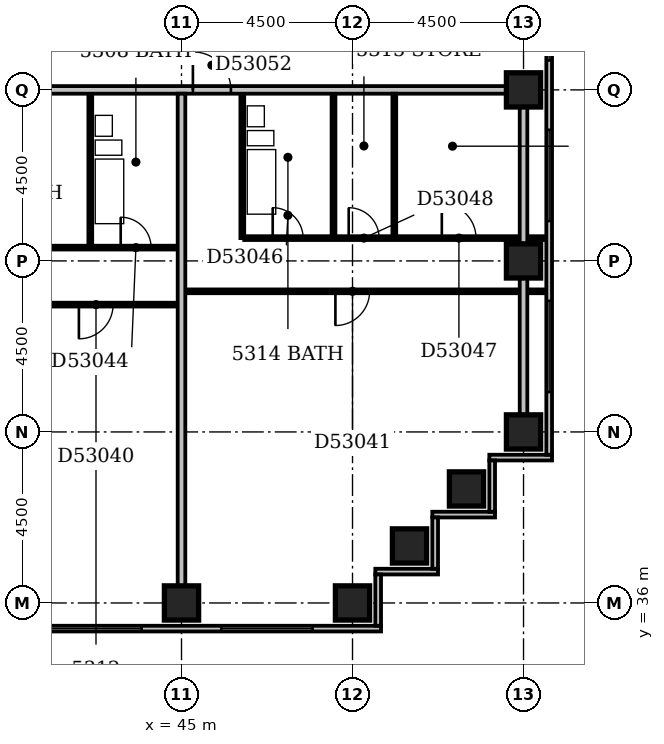
"""IFC4 building model, lengths in metres.
Left out: names, types, materials, properties, quantities, classifications, styles, units other than length and angle.
Written with IfcOpenShell. Run it as: python <this file> out.ifc"""

import sys

from ifc_helpers import new_model, si_unit, direction, frame, frame_2d, origin, origin_2d, place, context, subcontext, project, spatial, rectangle, extrude, element, fill, save


model = new_model("IFC4")
c1 = context("Model", 3, precision=1e-05, world=origin(), true_north=direction((0.0, 1.0)))
c2 = subcontext(c1, "Body", "Model", "MODEL_VIEW")
j1 = project(units=[si_unit("LENGTHUNIT", "METRE"), si_unit("PLANEANGLEUNIT", "RADIAN")], contexts=[c1])
p1 = place(None, origin())
s1 = spatial("IfcSite", under=j1, at=p1, CompositionType="ELEMENT")
p2 = place(p1, origin())
s2 = spatial("IfcBuilding", under=s1, at=p2, CompositionType="ELEMENT")
p3 = place(p2, frame((0.0, 0.0, 207.8)))
s3 = spatial("IfcBuildingStorey", under=s2, at=p3, CompositionType="ELEMENT", Elevation=207.8)
for number, where, z_axis, x_axis in (
    (1, (45.0, 36.0, -0.3), (0.0, 0.0, 1.0), (1.0, 0.0, 0.0)),
    (2, (49.5, 36.0, -0.3), (0.0, 0.0, 1.0), (1.0, 0.0, 0.0)),
    (3, (51.0, 37.5, -0.3), (0.0, 0.0, 1.0), (1.0, 0.0, 0.0)),
    (4, (52.5, 39.0, -0.3), (0.0, 0.0, 1.0), (1.0, 0.0, 0.0)),
    (5, (54.0, 40.5, -0.3), (0.0, 0.0, 1.0), (1.0, 0.0, 0.0)),
    (6, (54.0, 45.0, -0.3), (0.0, 0.0, 1.0), (1.0, 0.0, 0.0)),
    (7, (54.0, 49.5, -0.3), (0.0, 0.0, 1.0), (1.0, 0.0, 0.0)),
):
    element("IfcColumn", number, at=place(p3, frame(where, z_axis=z_axis, x_axis=x_axis)), inside=s3, PredefinedType="COLUMN", context=c2, shape_type="SweptSolid", body=[
        extrude(rectangle(XDim=0.9, YDim=0.9, at=origin_2d()), origin(), (0.0, 0.0, 1.0), 3.55),
    ])
p4 = place(p3, frame((23.1, 35.325, 0.0), z_axis=(0.0, 0.0, 1.0), x_axis=(1.0, 0.0, 0.0)))
e8 = element("IfcWall", 8, at=p4, inside=s3, PredefinedType="STANDARD", context=c2, shape_type="SweptSolid", body=[
    extrude(rectangle(XDim=27.15, YDim=0.15, at=frame_2d((13.575, 0.0))), origin(), (0.0, 0.0, 1.0), 2.7),
])
p5 = place(p4, frame((0.45, 0.0, 0.6)))
e9 = element("IfcOpeningElement", 9, at=p5, cuts=e8, PredefinedType="OPENING", context=c2, shape_type="SweptSolid", body=[
    extrude(rectangle(XDim=2.4, YDim=1.8, at=frame_2d((1.2, 0.9))), frame((0.0, 0.087, 0.0), z_axis=(0.0, -1.0, 0.0), x_axis=(1.0, 0.0, 0.0)), (0.0, 0.0, 1.0), 0.174),
])
p6 = place(p4, frame((4.95, 0.0, 0.6)))
e10 = element("IfcOpeningElement", 10, at=p6, cuts=e8, PredefinedType="OPENING", context=c2, shape_type="SweptSolid", body=[
    extrude(rectangle(XDim=2.4, YDim=1.8, at=frame_2d((1.2, 0.9))), frame((0.0, 0.087, 0.0), z_axis=(0.0, -1.0, 0.0), x_axis=(1.0, 0.0, 0.0)), (0.0, 0.0, 1.0), 0.174),
])
p7 = place(p4, frame((9.189, 0.0, 0.6)))
e11 = element("IfcOpeningElement", 11, at=p7, cuts=e8, PredefinedType="OPENING", context=c2, shape_type="SweptSolid", body=[
    extrude(rectangle(XDim=2.1, YDim=1.8, at=frame_2d((1.05, 0.9))), frame((0.0, 0.087, 0.0), z_axis=(0.0, -1.0, 0.0), x_axis=(1.0, 0.0, 0.0)), (0.0, 0.0, 1.0), 0.174),
])
p8 = place(p4, frame((14.558, 0.0, 0.6)))
e12 = element("IfcOpeningElement", 12, at=p8, cuts=e8, PredefinedType="OPENING", context=c2, shape_type="SweptSolid", body=[
    extrude(rectangle(XDim=2.1, YDim=1.8, at=frame_2d((1.05, 0.9))), frame((0.0, 0.087, 0.0), z_axis=(0.0, -1.0, 0.0), x_axis=(1.0, 0.0, 0.0)), (0.0, 0.0, 1.0), 0.174),
])
p9 = place(p4, frame((18.45, 0.0, 0.6)))
e13 = element("IfcOpeningElement", 13, at=p9, cuts=e8, PredefinedType="OPENING", context=c2, shape_type="SweptSolid", body=[
    extrude(rectangle(XDim=2.4, YDim=1.8, at=frame_2d((1.2, 0.9))), frame((0.0, 0.087, 0.0), z_axis=(0.0, -1.0, 0.0), x_axis=(1.0, 0.0, 0.0)), (0.0, 0.0, 1.0), 0.174),
])
p10 = place(p4, frame((22.95, 0.0, 0.6)))
e14 = element("IfcOpeningElement", 14, at=p10, cuts=e8, PredefinedType="OPENING", context=c2, shape_type="SweptSolid", body=[
    extrude(rectangle(XDim=2.4, YDim=1.8, at=frame_2d((1.2, 0.9))), frame((0.0, 0.087, 0.0), z_axis=(0.0, -1.0, 0.0), x_axis=(1.0, 0.0, 0.0)), (0.0, 0.0, 1.0), 0.174),
])
p11 = place(p3, frame((50.175, 35.4, 0.0), z_axis=(0.0, 0.0, 1.0), x_axis=(0.0, 1.0, 0.0)))
e15 = element("IfcWall", 15, at=p11, inside=s3, PredefinedType="STANDARD", context=c2, shape_type="SweptSolid", body=[
    extrude(rectangle(XDim=1.35, YDim=0.15, at=frame_2d((0.675, 0.0))), origin(), (0.0, 0.0, 1.0), 2.7),
])
p12 = place(p3, frame((50.1, 36.825, 0.0), z_axis=(0.0, 0.0, 1.0), x_axis=(1.0, 0.0, 0.0)))
e16 = element("IfcWall", 16, at=p12, inside=s3, PredefinedType="STANDARD", context=c2, shape_type="SweptSolid", body=[
    extrude(rectangle(XDim=1.65, YDim=0.15, at=frame_2d((0.825, 0.0))), origin(), (0.0, 0.0, 1.0), 2.7),
])
p13 = place(p3, frame((51.675, 36.9, 0.0), z_axis=(0.0, 0.0, 1.0), x_axis=(0.0, 1.0, 0.0)))
e17 = element("IfcWall", 17, at=p13, inside=s3, PredefinedType="STANDARD", context=c2, shape_type="SweptSolid", body=[
    extrude(rectangle(XDim=1.35, YDim=0.15, at=frame_2d((0.675, 0.0))), origin(), (0.0, 0.0, 1.0), 2.7),
])
p14 = place(p3, frame((51.6, 38.325, 0.0), z_axis=(0.0, 0.0, 1.0), x_axis=(1.0, 0.0, 0.0)))
e18 = element("IfcWall", 18, at=p14, inside=s3, PredefinedType="STANDARD", context=c2, shape_type="SweptSolid", body=[
    extrude(rectangle(XDim=1.65, YDim=0.15, at=frame_2d((0.825, 0.0))), origin(), (0.0, 0.0, 1.0), 2.7),
])
p15 = place(p3, frame((53.175, 38.4, 0.0), z_axis=(0.0, 0.0, 1.0), x_axis=(0.0, 1.0, 0.0)))
e19 = element("IfcWall", 19, at=p15, inside=s3, PredefinedType="STANDARD", context=c2, shape_type="SweptSolid", body=[
    extrude(rectangle(XDim=1.35, YDim=0.15, at=frame_2d((0.675, 0.0))), origin(), (0.0, 0.0, 1.0), 2.7),
])
p16 = place(p3, frame((53.1, 39.825, 0.0), z_axis=(0.0, 0.0, 1.0), x_axis=(1.0, 0.0, 0.0)))
e20 = element("IfcWall", 20, at=p16, inside=s3, PredefinedType="STANDARD", context=c2, shape_type="SweptSolid", body=[
    extrude(rectangle(XDim=1.65, YDim=0.15, at=frame_2d((0.825, 0.0))), origin(), (0.0, 0.0, 1.0), 2.7),
])
p17 = place(p3, frame((54.675, 39.9, 0.0), z_axis=(0.0, 0.0, 1.0), x_axis=(0.0, 1.0, 0.0)))
e21 = element("IfcWall", 21, at=p17, inside=s3, PredefinedType="STANDARD", context=c2, shape_type="SweptSolid", body=[
    extrude(rectangle(XDim=14.85, YDim=0.15, at=frame_2d((7.425, 0.0))), origin(), (0.0, 0.0, 1.0), 2.7),
])
p18 = place(p17, frame((1.65, 0.0, 0.6)))
e22 = element("IfcOpeningElement", 22, at=p18, cuts=e21, PredefinedType="OPENING", context=c2, shape_type="SweptSolid", body=[
    extrude(rectangle(XDim=2.4, YDim=1.8, at=frame_2d((1.2, 0.9))), frame((0.0, 0.087, 0.0), z_axis=(0.0, -1.0, 0.0), x_axis=(1.0, 0.0, 0.0)), (0.0, 0.0, 1.0), 0.174),
])
p19 = place(p17, frame((6.15, 0.0, 0.6)))
e23 = element("IfcOpeningElement", 23, at=p19, cuts=e21, PredefinedType="OPENING", context=c2, shape_type="SweptSolid", body=[
    extrude(rectangle(XDim=2.4, YDim=1.8, at=frame_2d((1.2, 0.9))), frame((0.0, 0.087, 0.0), z_axis=(0.0, -1.0, 0.0), x_axis=(1.0, 0.0, 0.0)), (0.0, 0.0, 1.0), 0.174),
])
p20 = place(p17, frame((10.375, 0.0, 0.6)))
e24 = element("IfcOpeningElement", 24, at=p20, cuts=e21, PredefinedType="OPENING", context=c2, shape_type="SweptSolid", body=[
    extrude(rectangle(XDim=0.9, YDim=1.8, at=frame_2d((0.45, 0.9))), frame((0.0, 0.087, 0.0), z_axis=(0.0, -1.0, 0.0), x_axis=(1.0, 0.0, 0.0)), (0.0, 0.0, 1.0), 0.174),
])
p21 = place(p17, frame((11.848, 0.0, 0.6)))
e25 = element("IfcOpeningElement", 25, at=p21, cuts=e21, PredefinedType="OPENING", context=c2, shape_type="SweptSolid", body=[
    extrude(rectangle(XDim=0.6, YDim=1.8, at=frame_2d((0.3, 0.9))), frame((0.0, 0.087, 0.0), z_axis=(0.0, -1.0, 0.0), x_axis=(1.0, 0.0, 0.0)), (0.0, 0.0, 1.0), 0.174),
])
p22 = place(p3, frame((45.0, 36.45, 0.0), z_axis=(0.0, 0.0, 1.0), x_axis=(0.0, 1.0, 0.0)))
e26 = element("IfcWall", 26, at=p22, inside=s3, PredefinedType="PARTITIONING", context=c2, shape_type="SweptSolid", body=[
    extrude(rectangle(XDim=12.95, YDim=0.2, at=frame_2d((6.475, 0.0))), origin(), (0.0, 0.0, 1.0), 2.55),
])
p23 = place(p3, frame((54.0, 40.95, 0.0), z_axis=(0.0, 0.0, 1.0), x_axis=(0.0, 1.0, 0.0)))
e27 = element("IfcWall", 27, at=p23, inside=s3, PredefinedType="PARTITIONING", context=c2, shape_type="SweptSolid", body=[
    extrude(rectangle(XDim=8.1, YDim=0.2, at=frame_2d((4.05, 0.0))), origin(), (0.0, 0.0, 1.0), 2.7),
])
p24 = place(p3, frame((31.6, 43.85, 0.0), z_axis=(0.0, 0.0, 1.0), x_axis=(1.0, 0.0, 0.0)))
e28 = element("IfcWall", 28, at=p24, inside=s3, PredefinedType="PARTITIONING", context=c2, shape_type="SweptSolid", body=[
    extrude(rectangle(XDim=13.3, YDim=0.1, at=frame_2d((6.65, 0.0))), origin(), (0.0, 0.0, 1.0), 3.25),
])
p25 = place(p24, frame((1.7, 0.0, 0.0)))
e29 = element("IfcOpeningElement", 29, at=p25, cuts=e28, PredefinedType="OPENING", context=c2, shape_type="SweptSolid", body=[
    extrude(rectangle(XDim=0.9, YDim=2.1, at=frame_2d((0.45, 1.05))), frame((0.0, 0.062, 0.0), z_axis=(0.0, -1.0, 0.0), x_axis=(1.0, 0.0, 0.0)), (0.0, 0.0, 1.0), 0.124),
])
p26 = place(p24, frame((7.35, 0.0, 0.0)))
e30 = element("IfcOpeningElement", 30, at=p26, cuts=e28, PredefinedType="OPENING", context=c2, shape_type="SweptSolid", body=[
    extrude(rectangle(XDim=0.9, YDim=2.1, at=frame_2d((0.45, 1.05))), frame((0.0, 0.062, 0.0), z_axis=(0.0, -1.0, 0.0), x_axis=(1.0, 0.0, 0.0)), (0.0, 0.0, 1.0), 0.124),
])
p27 = place(p24, frame((10.7, 0.0, 0.0)))
e31 = element("IfcOpeningElement", 31, at=p27, cuts=e28, PredefinedType="OPENING", context=c2, shape_type="SweptSolid", body=[
    extrude(rectangle(XDim=0.9, YDim=2.1, at=frame_2d((0.45, 1.05))), frame((0.0, 0.062, 0.0), z_axis=(0.0, -1.0, 0.0), x_axis=(1.0, 0.0, 0.0)), (0.0, 0.0, 1.0), 0.124),
])
p28 = place(p3, frame((45.1, 44.2, 0.0), z_axis=(0.0, 0.0, 1.0), x_axis=(1.0, 0.0, 0.0)))
e32 = element("IfcWall", 32, at=p28, inside=s3, PredefinedType="PARTITIONING", context=c2, shape_type="SweptSolid", body=[
    extrude(rectangle(XDim=9.5, YDim=0.1, at=frame_2d((4.75, 0.0))), origin(), (0.0, 0.0, 1.0), 3.25),
])
p29 = place(p28, frame((3.95, 0.0, 0.0)))
e33 = element("IfcOpeningElement", 33, at=p29, cuts=e32, PredefinedType="OPENING", context=c2, shape_type="SweptSolid", body=[
    extrude(rectangle(XDim=0.9, YDim=2.1, at=frame_2d((0.45, 1.05))), frame((0.0, 0.062, 0.0), z_axis=(0.0, -1.0, 0.0), x_axis=(1.0, 0.0, 0.0)), (0.0, 0.0, 1.0), 0.124),
])
p30 = place(p3, frame((33.15, 45.35, 0.0), z_axis=(0.0, 0.0, 1.0), x_axis=(1.0, 0.0, 0.0)))
e34 = element("IfcWall", 34, at=p30, inside=s3, PredefinedType="PARTITIONING", context=c2, shape_type="SweptSolid", body=[
    extrude(rectangle(XDim=11.75, YDim=0.1, at=frame_2d((5.875, 0.0))), origin(), (0.0, 0.0, 1.0), 3.25),
])
p31 = place(p30, frame((10.25, 0.0, 0.0)))
e35 = element("IfcOpeningElement", 35, at=p31, cuts=e34, PredefinedType="OPENING", context=c2, shape_type="SweptSolid", body=[
    extrude(rectangle(XDim=0.8, YDim=2.1, at=frame_2d((0.4, 1.05))), frame((0.0, 0.062, 0.0), z_axis=(0.0, -1.0, 0.0), x_axis=(1.0, 0.0, 0.0)), (0.0, 0.0, 1.0), 0.124),
])
p32 = place(p30, frame((4.25, 0.0, 0.0)))
e36 = element("IfcOpeningElement", 36, at=p32, cuts=e34, PredefinedType="OPENING", context=c2, shape_type="SweptSolid", body=[
    extrude(rectangle(XDim=0.9, YDim=2.1, at=frame_2d((0.45, 1.05))), frame((0.0, 0.062, 0.0), z_axis=(0.0, -1.0, 0.0), x_axis=(1.0, 0.0, 0.0)), (0.0, 0.0, 1.0), 0.124),
])
p33 = place(p3, frame((42.6, 45.4, 0.0), z_axis=(0.0, 0.0, 1.0), x_axis=(0.0, 1.0, 0.0)))
e37 = element("IfcWall", 37, at=p33, inside=s3, PredefinedType="PLUMBINGWALL", context=c2, shape_type="SweptSolid", body=[
    extrude(rectangle(XDim=4.0, YDim=0.1, at=frame_2d((2.0, 0.0))), origin(), (0.0, 0.0, 1.0), 3.25),
])
p34 = place(p3, frame((46.6, 45.6, 0.0), z_axis=(0.0, 0.0, 1.0), x_axis=(0.0, 1.0, 0.0)))
e38 = element("IfcWall", 38, at=p34, inside=s3, PredefinedType="PLUMBINGWALL", context=c2, shape_type="SweptSolid", body=[
    extrude(rectangle(XDim=3.8, YDim=0.1, at=frame_2d((1.9, 0.0))), origin(), (0.0, 0.0, 1.0), 3.25),
])
p35 = place(p3, frame((46.65, 45.6, 0.0), z_axis=(0.0, 0.0, 1.0), x_axis=(1.0, 0.0, 0.0)))
e39 = element("IfcWall", 39, at=p35, inside=s3, PredefinedType="PARTITIONING", context=c2, shape_type="SweptSolid", body=[
    extrude(rectangle(XDim=7.95, YDim=0.1, at=frame_2d((3.975, 0.0))), origin(), (0.0, 0.0, 1.0), 3.25),
])
p36 = place(p35, frame((0.75, 0.0, 0.0)))
e40 = element("IfcOpeningElement", 40, at=p36, cuts=e39, PredefinedType="OPENING", context=c2, shape_type="SweptSolid", body=[
    extrude(rectangle(XDim=0.8, YDim=2.1, at=frame_2d((0.4, 1.05))), frame((0.0, 0.062, 0.0), z_axis=(0.0, -1.0, 0.0), x_axis=(1.0, 0.0, 0.0)), (0.0, 0.0, 1.0), 0.124),
])
p37 = place(p35, frame((5.2, 0.0, 0.0)))
e41 = element("IfcOpeningElement", 41, at=p37, cuts=e39, PredefinedType="OPENING", context=c2, shape_type="SweptSolid", body=[
    extrude(rectangle(XDim=0.9, YDim=2.1, at=frame_2d((0.45, 1.05))), frame((0.0, 0.062, 0.0), z_axis=(0.0, -1.0, 0.0), x_axis=(1.0, 0.0, 0.0)), (0.0, 0.0, 1.0), 0.124),
])
p38 = place(p35, frame((2.75, 0.0, 0.0)))
e42 = element("IfcOpeningElement", 42, at=p38, cuts=e39, PredefinedType="OPENING", context=c2, shape_type="SweptSolid", body=[
    extrude(rectangle(XDim=0.8, YDim=2.1, at=frame_2d((0.4, 1.05))), frame((0.0, 0.062, 0.0), z_axis=(0.0, -1.0, 0.0), x_axis=(1.0, 0.0, 0.0)), (0.0, 0.0, 1.0), 0.124),
])
p39 = place(p3, frame((49.0, 45.65, 0.0), z_axis=(0.0, 0.0, 1.0), x_axis=(0.0, 1.0, 0.0)))
e43 = element("IfcWall", 43, at=p39, inside=s3, PredefinedType="PLUMBINGWALL", context=c2, shape_type="SweptSolid", body=[
    extrude(rectangle(XDim=3.75, YDim=0.1, at=frame_2d((1.875, 0.0))), origin(), (0.0, 0.0, 1.0), 3.25),
])
p40 = place(p3, frame((50.6, 45.65, 0.0), z_axis=(0.0, 0.0, 1.0), x_axis=(0.0, 1.0, 0.0)))
e44 = element("IfcWall", 44, at=p40, inside=s3, PredefinedType="PARTITIONING", context=c2, shape_type="SweptSolid", body=[
    extrude(rectangle(XDim=3.75, YDim=0.1, at=frame_2d((1.875, 0.0))), origin(), (0.0, 0.0, 1.0), 3.25),
])
p41 = place(p3, frame((22.6, 49.5, 0.0), z_axis=(0.0, 0.0, 1.0), x_axis=(1.0, 0.0, 0.0)))
e45 = element("IfcWall", 45, at=p41, inside=s3, PredefinedType="PARTITIONING", context=c2, shape_type="SweptSolid", body=[
    extrude(rectangle(XDim=30.95, YDim=0.2, at=frame_2d((15.475, 0.0))), origin(), (0.0, 0.0, 1.0), 3.25),
])
p42 = place(p41, frame((0.2, 0.0, 0.0)))
e46 = element("IfcOpeningElement", 46, at=p42, cuts=e45, PredefinedType="OPENING", context=c2, shape_type="SweptSolid", body=[
    extrude(rectangle(XDim=1.0, YDim=2.1, at=frame_2d((0.5, 1.05))), frame((0.0, 0.112, 0.0), z_axis=(0.0, -1.0, 0.0), x_axis=(1.0, 0.0, 0.0)), (0.0, 0.0, 1.0), 0.224),
])
p43 = place(p41, frame((9.2, 0.0, 0.0)))
e47 = element("IfcOpeningElement", 47, at=p43, cuts=e45, PredefinedType="OPENING", context=c2, shape_type="SweptSolid", body=[
    extrude(rectangle(XDim=1.0, YDim=2.1, at=frame_2d((0.5, 1.05))), frame((0.0, 0.112, 0.0), z_axis=(0.0, -1.0, 0.0), x_axis=(1.0, 0.0, 0.0)), (0.0, 0.0, 1.0), 0.224),
])
p44 = place(p41, frame((22.7, 0.0, 0.0)))
e48 = element("IfcOpeningElement", 48, at=p44, cuts=e45, PredefinedType="OPENING", context=c2, shape_type="SweptSolid", body=[
    extrude(rectangle(XDim=1.0, YDim=2.1, at=frame_2d((0.5, 1.05))), frame((0.0, 0.112, 0.0), z_axis=(0.0, -1.0, 0.0), x_axis=(1.0, 0.0, 0.0)), (0.0, 0.0, 1.0), 0.224),
])
p45 = place(p9, origin())
e49 = element("IfcWindow", 49, at=p45, inside=s3, PartitioningType="SINGLE_PANEL", PredefinedType="WINDOW", context=c2, shape_type="SweptSolid", body=[
    extrude(rectangle(XDim=2.4, YDim=1.8, at=frame_2d((1.2, 0.9))), frame((0.0, 0.03, 0.0), z_axis=(0.0, -1.0, 0.0), x_axis=(1.0, 0.0, 0.0)), (0.0, 0.0, 1.0), 0.06),
])
fill(e13, e49)
p46 = place(p10, origin())
e50 = element("IfcWindow", 50, at=p46, inside=s3, PartitioningType="SINGLE_PANEL", PredefinedType="WINDOW", context=c2, shape_type="SweptSolid", body=[
    extrude(rectangle(XDim=2.4, YDim=1.8, at=frame_2d((1.2, 0.9))), frame((0.0, 0.03, 0.0), z_axis=(0.0, -1.0, 0.0), x_axis=(1.0, 0.0, 0.0)), (0.0, 0.0, 1.0), 0.06),
])
fill(e14, e50)
p47 = place(p18, origin())
e51 = element("IfcWindow", 51, at=p47, inside=s3, PartitioningType="SINGLE_PANEL", PredefinedType="WINDOW", context=c2, shape_type="SweptSolid", body=[
    extrude(rectangle(XDim=2.4, YDim=1.8, at=frame_2d((1.2, 0.9))), frame((0.0, 0.03, 0.0), z_axis=(0.0, -1.0, 0.0), x_axis=(1.0, 0.0, 0.0)), (0.0, 0.0, 1.0), 0.06),
])
fill(e22, e51)
p48 = place(p19, origin())
e52 = element("IfcWindow", 52, at=p48, inside=s3, PartitioningType="SINGLE_PANEL", PredefinedType="WINDOW", context=c2, shape_type="SweptSolid", body=[
    extrude(rectangle(XDim=2.4, YDim=1.8, at=frame_2d((1.2, 0.9))), frame((0.0, 0.03, 0.0), z_axis=(0.0, -1.0, 0.0), x_axis=(1.0, 0.0, 0.0)), (0.0, 0.0, 1.0), 0.06),
])
fill(e23, e52)
p49 = place(p20, origin())
e53 = element("IfcWindow", 53, at=p49, inside=s3, PartitioningType="SINGLE_PANEL", PredefinedType="WINDOW", context=c2, shape_type="SweptSolid", body=[
    extrude(rectangle(XDim=0.9, YDim=1.8, at=frame_2d((0.45, 0.9))), frame((0.0, 0.03, 0.0), z_axis=(0.0, -1.0, 0.0), x_axis=(1.0, 0.0, 0.0)), (0.0, 0.0, 1.0), 0.06),
])
fill(e24, e53)
p50 = place(p27, frame((0.9, 0.0, 0.0), z_axis=(0.0, 0.0, 1.0), x_axis=(-1.0, 0.0, 0.0)))
e54 = element("IfcDoor", 54, at=p50, inside=s3, OperationType="SINGLE_SWING_RIGHT", PredefinedType="DOOR", context=c2, shape_type="SweptSolid", body=[
    extrude(rectangle(XDim=0.9, YDim=2.1, at=frame_2d((0.45, 1.05))), frame((0.0, 0.025, 0.0), z_axis=(0.0, -1.0, 0.0), x_axis=(1.0, 0.0, 0.0)), (0.0, 0.0, 1.0), 0.05),
])
fill(e31, e54)
p51 = place(p29, frame((0.9, 0.0, 0.0), z_axis=(0.0, 0.0, 1.0), x_axis=(-1.0, 0.0, 0.0)))
e55 = element("IfcDoor", 55, at=p51, inside=s3, OperationType="SINGLE_SWING_RIGHT", PredefinedType="DOOR", context=c2, shape_type="SweptSolid", body=[
    extrude(rectangle(XDim=0.9, YDim=2.1, at=frame_2d((0.45, 1.05))), frame((0.0, 0.025, 0.0), z_axis=(0.0, -1.0, 0.0), x_axis=(1.0, 0.0, 0.0)), (0.0, 0.0, 1.0), 0.05),
])
fill(e33, e55)
p52 = place(p31, origin())
e56 = element("IfcDoor", 56, at=p52, inside=s3, OperationType="SINGLE_SWING_LEFT", PredefinedType="DOOR", context=c2, shape_type="SweptSolid", body=[
    extrude(rectangle(XDim=0.8, YDim=2.1, at=frame_2d((0.4, 1.05))), frame((0.0, 0.025, 0.0), z_axis=(0.0, -1.0, 0.0), x_axis=(1.0, 0.0, 0.0)), (0.0, 0.0, 1.0), 0.05),
])
fill(e35, e56)
p53 = place(p36, origin())
e57 = element("IfcDoor", 57, at=p53, inside=s3, OperationType="SINGLE_SWING_LEFT", PredefinedType="DOOR", context=c2, shape_type="SweptSolid", body=[
    extrude(rectangle(XDim=0.8, YDim=2.1, at=frame_2d((0.4, 1.05))), frame((0.0, 0.025, 0.0), z_axis=(0.0, -1.0, 0.0), x_axis=(1.0, 0.0, 0.0)), (0.0, 0.0, 1.0), 0.05),
])
fill(e40, e57)
p54 = place(p37, origin())
e58 = element("IfcDoor", 58, at=p54, inside=s3, OperationType="SINGLE_SWING_LEFT", PredefinedType="DOOR", context=c2, shape_type="SweptSolid", body=[
    extrude(rectangle(XDim=0.9, YDim=2.1, at=frame_2d((0.45, 1.05))), frame((0.0, 0.025, 0.0), z_axis=(0.0, -1.0, 0.0), x_axis=(1.0, 0.0, 0.0)), (0.0, 0.0, 1.0), 0.05),
])
fill(e41, e58)
p55 = place(p38, origin())
e59 = element("IfcDoor", 59, at=p55, inside=s3, OperationType="SINGLE_SWING_LEFT", PredefinedType="DOOR", context=c2, shape_type="SweptSolid", body=[
    extrude(rectangle(XDim=0.8, YDim=2.1, at=frame_2d((0.4, 1.05))), frame((0.0, 0.025, 0.0), z_axis=(0.0, -1.0, 0.0), x_axis=(1.0, 0.0, 0.0)), (0.0, 0.0, 1.0), 0.05),
])
fill(e42, e59)
p56 = place(p44, origin())
e60 = element("IfcDoor", 60, at=p56, inside=s3, OperationType="SINGLE_SWING_LEFT", PredefinedType="DOOR", context=c2, shape_type="SweptSolid", body=[
    extrude(rectangle(XDim=1.0, YDim=2.1, at=frame_2d((0.5, 1.05))), frame((0.0, 0.025, 0.0), z_axis=(0.0, -1.0, 0.0), x_axis=(1.0, 0.0, 0.0)), (0.0, 0.0, 1.0), 0.05),
])
fill(e48, e60)
save(model, sys.argv[1])
